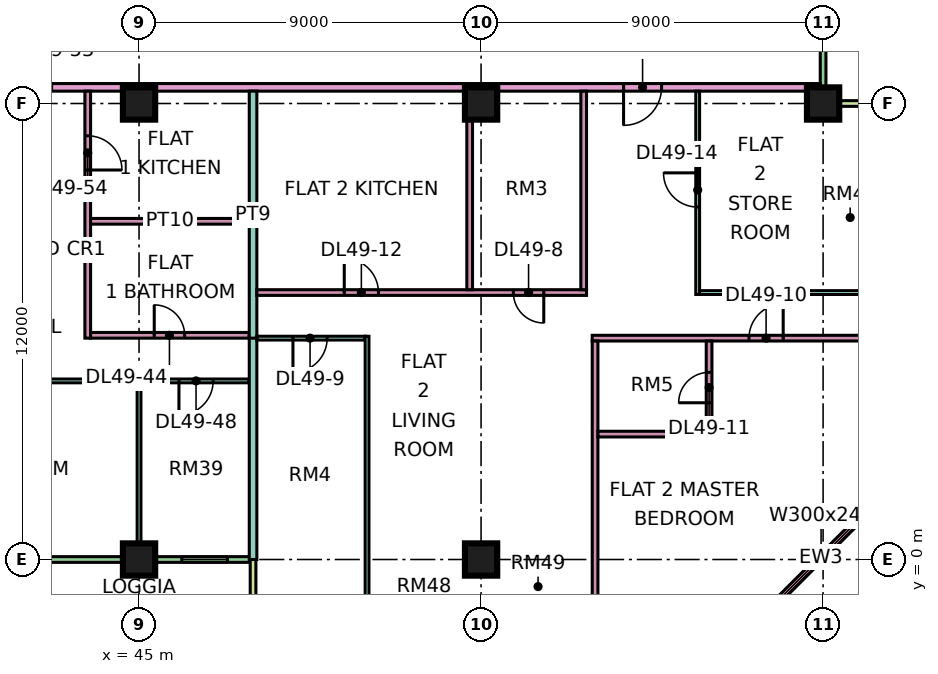
"""IFC4 building model, lengths in metres.
Left out: names, types, materials, properties, quantities, classifications, styles, units other than length and angle.
Written with IfcOpenShell. Run it as: python <this file> out.ifc"""

import sys

from ifc_helpers import new_model, si_unit, direction, frame, frame_2d, origin, origin_2d, place, context, subcontext, project, spatial, rectangle, extrude, element, fill, save


model = new_model("IFC4")
c1 = context("Model", 3, precision=1e-05, world=origin(), true_north=direction((0.0, 1.0)))
c2 = subcontext(c1, "Body", "Model", "MODEL_VIEW")
j1 = project(units=[si_unit("LENGTHUNIT", "METRE"), si_unit("PLANEANGLEUNIT", "RADIAN")], contexts=[c1])
p1 = place(None, origin())
s1 = spatial("IfcSite", under=j1, at=p1, CompositionType="ELEMENT")
p2 = place(p1, origin())
s2 = spatial("IfcBuilding", under=s1, at=p2, CompositionType="ELEMENT")
p3 = place(p2, frame((0.0, 0.0, 211.65)))
s3 = spatial("IfcBuildingStorey", under=s2, at=p3, CompositionType="ELEMENT", Elevation=211.65)
for number, where, z_axis, x_axis in (
    (1, (45.0, 0.0, 0.0), (0.0, 0.0, 1.0), (1.0, 0.0, 0.0)),
    (2, (45.0, 12.0, 0.0), (0.0, 0.0, 1.0), (1.0, 0.0, 0.0)),
    (3, (54.0, 0.0, 0.0), (0.0, 0.0, 1.0), (1.0, 0.0, 0.0)),
    (4, (54.0, 12.0, 0.0), (0.0, 0.0, 1.0), (1.0, 0.0, 0.0)),
    (5, (63.0, 12.0, 0.0), (0.0, 0.0, 1.0), (1.0, 0.0, 0.0)),
):
    element("IfcColumn", number, at=place(p3, frame(where, z_axis=z_axis, x_axis=x_axis)), inside=s3, PredefinedType="COLUMN", context=c2, shape_type="SweptSolid", body=[
        extrude(rectangle(XDim=0.85, YDim=0.85, at=origin_2d()), origin(), (0.0, 0.0, 1.0), 3.75),
    ])
p4 = place(p3, frame((36.075, 0.0, 0.0), z_axis=(0.0, 0.0, 1.0), x_axis=(1.0, 0.0, 0.0)))
e6 = element("IfcWall", 6, at=p4, inside=s3, PredefinedType="SOLIDWALL", context=c2, shape_type="SweptSolid", body=[
    extrude(rectangle(XDim=11.85, YDim=0.15, at=frame_2d((5.925, 0.0))), origin(), (0.0, 0.0, 1.0), 3.35),
])
p5 = place(p4, frame((3.525, 0.0, 0.0)))
e7 = element("IfcOpeningElement", 7, at=p5, cuts=e6, PredefinedType="OPENING", context=c2, shape_type="SweptSolid", body=[
    extrude(rectangle(XDim=1.8, YDim=2.4, at=frame_2d((0.9, 1.2))), frame((0.0, 0.085, 0.0), z_axis=(0.0, -1.0, 0.0), x_axis=(1.0, 0.0, 0.0)), (0.0, 0.0, 1.0), 0.17),
])
p6 = place(p4, frame((10.05, 0.0, 0.45)))
e8 = element("IfcOpeningElement", 8, at=p6, cuts=e6, PredefinedType="OPENING", context=c2, shape_type="SweptSolid", body=[
    extrude(rectangle(XDim=1.2, YDim=2.4, at=frame_2d((0.6, 1.2))), frame((0.0, 0.085, 0.0), z_axis=(0.0, -1.0, 0.0), x_axis=(1.0, 0.0, 0.0)), (0.0, 0.0, 1.0), 0.17),
])
p7 = place(p3, frame((48.0, -1.5, 0.0), z_axis=(0.0, 0.0, 1.0), x_axis=(0.0, 1.0, 0.0)))
e9 = element("IfcWall", 9, at=p7, inside=s3, PredefinedType="SOLIDWALL", context=c2, shape_type="SweptSolid", body=[
    extrude(rectangle(XDim=1.5, YDim=0.15, at=frame_2d((0.75, 0.0))), origin(), (0.0, 0.0, 1.0), 3.35),
])
p8 = place(p3, frame((61.447, -1.447, 0.0), z_axis=(0.0, 0.0, 1.0), x_axis=(0.707106781187, 0.707106781187, 0.0)))
e10 = element("IfcWall", 10, at=p8, inside=s3, PredefinedType="SOLIDWALL", context=c2, shape_type="SweptSolid", body=[
    extrude(rectangle(XDim=4.243, YDim=0.15, at=frame_2d((2.121, 0.0))), origin(), (0.0, 0.0, 1.0), 3.35),
])
p9 = place(p8, frame((0.621, 0.0, 0.45)))
e11 = element("IfcOpeningElement", 11, at=p9, cuts=e10, PredefinedType="OPENING", context=c2, shape_type="SweptSolid", body=[
    extrude(rectangle(XDim=3.0, YDim=2.4, at=frame_2d((1.5, 1.2))), frame((0.0, 0.085, 0.0), z_axis=(0.0, -1.0, 0.0), x_axis=(1.0, 0.0, 0.0)), (0.0, 0.0, 1.0), 0.17),
])
p10 = place(p3, frame((63.0, 12.075, 0.0), z_axis=(0.0, 0.0, 1.0), x_axis=(0.0, 1.0, 0.0)))
e12 = element("IfcWall", 12, at=p10, inside=s3, PredefinedType="SOLIDWALL", context=c2, shape_type="SweptSolid", body=[
    extrude(rectangle(XDim=10.35, YDim=0.15, at=frame_2d((5.175, 0.0))), origin(), (0.0, 0.0, 1.0), 3.35),
])
p11 = place(p10, frame((4.125, 0.0, 0.45)))
e13 = element("IfcOpeningElement", 13, at=p11, cuts=e12, PredefinedType="OPENING", context=c2, shape_type="SweptSolid", body=[
    extrude(rectangle(XDim=1.8, YDim=2.4, at=frame_2d((0.9, 1.2))), frame((0.0, 0.085, 0.0), z_axis=(0.0, -1.0, 0.0), x_axis=(1.0, 0.0, 0.0)), (0.0, 0.0, 1.0), 0.17),
])
p12 = place(p10, frame((7.538, 0.0, 0.0)))
e14 = element("IfcOpeningElement", 14, at=p12, cuts=e12, PredefinedType="OPENING", context=c2, shape_type="SweptSolid", body=[
    extrude(rectangle(XDim=1.8, YDim=2.4, at=frame_2d((0.9, 1.2))), frame((0.0, 0.085, 0.0), z_axis=(0.0, -1.0, 0.0), x_axis=(1.0, 0.0, 0.0)), (0.0, 0.0, 1.0), 0.17),
])
p13 = place(p3, frame((64.5, 12.0, 0.0), z_axis=(0.0, 0.0, 1.0), x_axis=(-1.0, 0.0, 0.0)))
e15 = element("IfcWall", 15, at=p13, inside=s3, PredefinedType="SOLIDWALL", context=c2, shape_type="SweptSolid", body=[
    extrude(rectangle(XDim=1.5, YDim=0.15, at=frame_2d((0.75, 0.0))), origin(), (0.0, 0.0, 1.0), 3.35),
])
p14 = place(p3, frame((33.05, 4.7, 0.0), z_axis=(0.0, 0.0, 1.0), x_axis=(1.0, 0.0, 0.0)))
e16 = element("IfcWall", 16, at=p14, inside=s3, PredefinedType="PARTITIONING", context=c2, shape_type="SweptSolid", body=[
    extrude(rectangle(XDim=14.85, YDim=0.1, at=frame_2d((7.425, 0.0))), origin(), (0.0, 0.0, 1.0), 3.35),
])
p15 = place(p14, frame((1.0, 0.0, 0.0)))
e17 = element("IfcOpeningElement", 17, at=p15, cuts=e16, PredefinedType="OPENING", context=c2, shape_type="SweptSolid", body=[
    extrude(rectangle(XDim=0.9, YDim=2.1, at=frame_2d((0.45, 1.05))), frame((0.0, 0.06, 0.0), z_axis=(0.0, -1.0, 0.0), x_axis=(1.0, 0.0, 0.0)), (0.0, 0.0, 1.0), 0.12),
])
p16 = place(p14, frame((13.0, 0.0, 0.0)))
e18 = element("IfcOpeningElement", 18, at=p16, cuts=e16, PredefinedType="OPENING", context=c2, shape_type="SweptSolid", body=[
    extrude(rectangle(XDim=0.9, YDim=2.1, at=frame_2d((0.45, 1.05))), frame((0.0, 0.06, 0.0), z_axis=(0.0, -1.0, 0.0), x_axis=(1.0, 0.0, 0.0)), (0.0, 0.0, 1.0), 0.12),
])
p17 = place(p14, frame((7.0, 0.0, 0.0)))
e19 = element("IfcOpeningElement", 19, at=p17, cuts=e16, PredefinedType="OPENING", context=c2, shape_type="SweptSolid", body=[
    extrude(rectangle(XDim=0.9, YDim=2.1, at=frame_2d((0.45, 1.05))), frame((0.0, 0.06, 0.0), z_axis=(0.0, -1.0, 0.0), x_axis=(1.0, 0.0, 0.0)), (0.0, 0.0, 1.0), 0.12),
])
p18 = place(p3, frame((40.65, 12.425, 0.0), z_axis=(0.0, 0.0, 1.0), x_axis=(1.0, 0.0, 0.0)))
e20 = element("IfcWall", 20, at=p18, inside=s3, PredefinedType="PARTITIONING", context=c2, shape_type="SweptSolid", body=[
    extrude(rectangle(XDim=22.276, YDim=0.2, at=frame_2d((11.138, 0.0))), origin(), (0.0, 0.0, 1.0), 3.35),
])
p19 = place(p18, frame((17.1, 0.0, 0.0)))
e21 = element("IfcOpeningElement", 21, at=p19, cuts=e20, PredefinedType="OPENING", context=c2, shape_type="SweptSolid", body=[
    extrude(rectangle(XDim=1.0, YDim=2.1, at=frame_2d((0.5, 1.05))), frame((0.0, 0.11, 0.0), z_axis=(0.0, -1.0, 0.0), x_axis=(1.0, 0.0, 0.0)), (0.0, 0.0, 1.0), 0.22),
])
p20 = place(p18, frame((1.05, 0.0, 0.0)))
e22 = element("IfcOpeningElement", 22, at=p20, cuts=e20, PredefinedType="OPENING", context=c2, shape_type="SweptSolid", body=[
    extrude(rectangle(XDim=1.0, YDim=2.1, at=frame_2d((0.5, 1.05))), frame((0.0, 0.11, 0.0), z_axis=(0.0, -1.0, 0.0), x_axis=(1.0, 0.0, 0.0)), (0.0, 0.0, 1.0), 0.22),
])
p21 = place(p3, frame((43.65, 5.825, 0.0), z_axis=(0.0, 0.0, 1.0), x_axis=(0.0, 1.0, 0.0)))
e23 = element("IfcWall", 23, at=p21, inside=s3, PredefinedType="PARTITIONING", context=c2, shape_type="SweptSolid", body=[
    extrude(rectangle(XDim=6.5, YDim=0.15, at=frame_2d((3.25, 0.0))), origin(), (0.0, 0.0, 1.0), 3.35),
])
p22 = place(p21, frame((4.425, 0.0, 0.0)))
e24 = element("IfcOpeningElement", 24, at=p22, cuts=e23, PredefinedType="OPENING", context=c2, shape_type="SweptSolid", body=[
    extrude(rectangle(XDim=0.9, YDim=2.1, at=frame_2d((0.45, 1.05))), frame((0.0, 0.085, 0.0), z_axis=(0.0, -1.0, 0.0), x_axis=(1.0, 0.0, 0.0)), (0.0, 0.0, 1.0), 0.17),
])
p23 = place(p3, frame((43.725, 5.9, 0.0), z_axis=(0.0, 0.0, 1.0), x_axis=(1.0, 0.0, 0.0)))
e25 = element("IfcWall", 25, at=p23, inside=s3, PredefinedType="PARTITIONING", context=c2, shape_type="SweptSolid", body=[
    extrude(rectangle(XDim=4.175, YDim=0.15, at=frame_2d((2.087, 0.0))), origin(), (0.0, 0.0, 1.0), 3.35),
])
p24 = place(p23, frame((1.675, 0.0, 0.0)))
e26 = element("IfcOpeningElement", 26, at=p24, cuts=e25, PredefinedType="OPENING", context=c2, shape_type="SweptSolid", body=[
    extrude(rectangle(XDim=0.8, YDim=2.1, at=frame_2d((0.4, 1.05))), frame((0.0, 0.085, 0.0), z_axis=(0.0, -1.0, 0.0), x_axis=(1.0, 0.0, 0.0)), (0.0, 0.0, 1.0), 0.17),
])
p25 = place(p3, frame((43.725, 8.9, 0.0), z_axis=(0.0, 0.0, 1.0), x_axis=(1.0, 0.0, 0.0)))
e27 = element("IfcWall", 27, at=p25, inside=s3, PredefinedType="PARTITIONING", context=c2, shape_type="SweptSolid", body=[
    extrude(rectangle(XDim=4.175, YDim=0.15, at=frame_2d((2.087, 0.0))), origin(), (0.0, 0.0, 1.0), 3.35),
])
p26 = place(p3, frame((45.0, 0.074, 0.0), z_axis=(0.0, 0.0, 1.0), x_axis=(0.0, 1.0, 0.0)))
e28 = element("IfcWall", 28, at=p26, inside=s3, PredefinedType="PARTITIONING", context=c2, shape_type="SweptSolid", body=[
    extrude(rectangle(XDim=4.576, YDim=0.1, at=frame_2d((2.288, 0.0))), origin(), (0.0, 0.0, 1.0), 3.35),
])
p27 = place(p3, frame((48.0, 0.0, 0.0), z_axis=(0.0, 0.0, 1.0), x_axis=(0.0, 1.0, 0.0)))
e29 = element("IfcWall", 29, at=p27, inside=s3, PredefinedType="PARTITIONING", context=c2, shape_type="SweptSolid", body=[
    extrude(rectangle(XDim=5.875, YDim=0.2, at=frame_2d((2.938, 0.0))), origin(), (0.0, 0.0, 1.0), 3.35),
])
p28 = place(p3, frame((48.0, 5.825, 0.0), z_axis=(0.0, 0.0, 1.0), x_axis=(0.0, 1.0, 0.0)))
e30 = element("IfcWall", 30, at=p28, inside=s3, PredefinedType="PARTITIONING", context=c2, shape_type="SweptSolid", body=[
    extrude(rectangle(XDim=6.5, YDim=0.2, at=frame_2d((3.25, 0.0))), origin(), (0.0, 0.0, 1.0), 3.35),
])
p29 = place(p3, frame((48.1, 5.825, 0.0), z_axis=(0.0, 0.0, 1.0), x_axis=(1.0, 0.0, 0.0)))
e31 = element("IfcWall", 31, at=p29, inside=s3, PredefinedType="PARTITIONING", context=c2, shape_type="SweptSolid", body=[
    extrude(rectangle(XDim=2.85, YDim=0.1, at=frame_2d((1.425, 0.0))), origin(), (0.0, 0.0, 1.0), 3.35),
])
p30 = place(p29, frame((0.95, 0.0, 0.0)))
e32 = element("IfcOpeningElement", 32, at=p30, cuts=e31, PredefinedType="OPENING", context=c2, shape_type="SweptSolid", body=[
    extrude(rectangle(XDim=0.9, YDim=2.1, at=frame_2d((0.45, 1.05))), frame((0.0, 0.06, 0.0), z_axis=(0.0, -1.0, 0.0), x_axis=(1.0, 0.0, 0.0)), (0.0, 0.0, 1.0), 0.12),
])
p31 = place(p3, frame((48.1, 7.025, 0.0), z_axis=(0.0, 0.0, 1.0), x_axis=(1.0, 0.0, 0.0)))
e33 = element("IfcWall", 33, at=p31, inside=s3, PredefinedType="PARTITIONING", context=c2, shape_type="SweptSolid", body=[
    extrude(rectangle(XDim=8.675, YDim=0.15, at=frame_2d((4.337, 0.0))), origin(), (0.0, 0.0, 1.0), 3.35),
])
p32 = place(p31, frame((6.75, 0.0, 0.0)))
e34 = element("IfcOpeningElement", 34, at=p32, cuts=e33, PredefinedType="OPENING", context=c2, shape_type="SweptSolid", body=[
    extrude(rectangle(XDim=0.8, YDim=2.1, at=frame_2d((0.4, 1.05))), frame((0.0, 0.085, 0.0), z_axis=(0.0, -1.0, 0.0), x_axis=(1.0, 0.0, 0.0)), (0.0, 0.0, 1.0), 0.17),
])
p33 = place(p31, frame((2.3, 0.0, 0.0)))
e35 = element("IfcOpeningElement", 35, at=p33, cuts=e33, PredefinedType="OPENING", context=c2, shape_type="SweptSolid", body=[
    extrude(rectangle(XDim=0.9, YDim=2.1, at=frame_2d((0.45, 1.05))), frame((0.0, 0.085, 0.0), z_axis=(0.0, -1.0, 0.0), x_axis=(1.0, 0.0, 0.0)), (0.0, 0.0, 1.0), 0.17),
])
p34 = place(p3, frame((51.0, -1.35, 0.0), z_axis=(0.0, 0.0, 1.0), x_axis=(0.0, 1.0, 0.0)))
e36 = element("IfcWall", 36, at=p34, inside=s3, PredefinedType="PARTITIONING", context=c2, shape_type="SweptSolid", body=[
    extrude(rectangle(XDim=7.225, YDim=0.1, at=frame_2d((3.613, 0.0))), origin(), (0.0, 0.0, 1.0), 3.35),
])
for number, where, z_axis, x_axis in (
    (37, (53.7, 7.1, 0.0), (0.0, 0.0, 1.0), (0.0, 1.0, 0.0)),
    (38, (56.7, 7.1, 0.0), (0.0, 0.0, 1.0), (0.0, 1.0, 0.0)),
):
    element("IfcWall", number, at=place(p3, frame(where, z_axis=z_axis, x_axis=x_axis)), inside=s3, PredefinedType="PARTITIONING", context=c2, shape_type="SweptSolid", body=[
        extrude(rectangle(XDim=5.225, YDim=0.15, at=frame_2d((2.612, 0.0))), origin(), (0.0, 0.0, 1.0), 3.35),
    ])
p35 = place(p3, frame((56.925, 5.825, 0.0), z_axis=(0.0, 0.0, 1.0), x_axis=(1.0, 0.0, 0.0)))
e39 = element("IfcWall", 39, at=p35, inside=s3, PredefinedType="PARTITIONING", context=c2, shape_type="SweptSolid", body=[
    extrude(rectangle(XDim=7.425, YDim=0.15, at=frame_2d((3.712, 0.0))), origin(), (0.0, 0.0, 1.0), 3.35),
])
p36 = place(p35, frame((4.125, 0.0, 0.0)))
e40 = element("IfcOpeningElement", 40, at=p36, cuts=e39, PredefinedType="OPENING", context=c2, shape_type="SweptSolid", body=[
    extrude(rectangle(XDim=0.9, YDim=2.1, at=frame_2d((0.45, 1.05))), frame((0.0, 0.085, 0.0), z_axis=(0.0, -1.0, 0.0), x_axis=(1.0, 0.0, 0.0)), (0.0, 0.0, 1.0), 0.17),
])
p37 = place(p3, frame((57.0, -1.35, 0.0), z_axis=(0.0, 0.0, 1.0), x_axis=(0.0, 1.0, 0.0)))
e41 = element("IfcWall", 41, at=p37, inside=s3, PredefinedType="PARTITIONING", context=c2, shape_type="SweptSolid", body=[
    extrude(rectangle(XDim=7.1, YDim=0.15, at=frame_2d((3.55, 0.0))), origin(), (0.0, 0.0, 1.0), 3.35),
])
p38 = place(p3, frame((57.075, 3.3, 0.0), z_axis=(0.0, 0.0, 1.0), x_axis=(1.0, 0.0, 0.0)))
e42 = element("IfcWall", 42, at=p38, inside=s3, PredefinedType="PARTITIONING", context=c2, shape_type="SweptSolid", body=[
    extrude(rectangle(XDim=3.0, YDim=0.15, at=frame_2d((1.5, 0.0))), origin(), (0.0, 0.0, 1.0), 3.35),
])
p39 = place(p3, frame((59.7, 6.975, 0.0), z_axis=(0.0, 0.0, 1.0), x_axis=(0.0, 1.0, 0.0)))
e43 = element("IfcWall", 43, at=p39, inside=s3, PredefinedType="PARTITIONING", context=c2, shape_type="SweptSolid", body=[
    extrude(rectangle(XDim=5.35, YDim=0.1, at=frame_2d((2.675, 0.0))), origin(), (0.0, 0.0, 1.0), 3.35),
])
p40 = place(p39, frame((2.3, 0.0, 0.0)))
e44 = element("IfcOpeningElement", 44, at=p40, cuts=e43, PredefinedType="OPENING", context=c2, shape_type="SweptSolid", body=[
    extrude(rectangle(XDim=0.9, YDim=2.1, at=frame_2d((0.45, 1.05))), frame((0.0, 0.06, 0.0), z_axis=(0.0, -1.0, 0.0), x_axis=(1.0, 0.0, 0.0)), (0.0, 0.0, 1.0), 0.12),
])
p41 = place(p3, frame((59.75, 7.025, 0.0), z_axis=(0.0, 0.0, 1.0), x_axis=(1.0, 0.0, 0.0)))
e45 = element("IfcWall", 45, at=p41, inside=s3, PredefinedType="PARTITIONING", context=c2, shape_type="SweptSolid", body=[
    extrude(rectangle(XDim=4.6, YDim=0.1, at=frame_2d((2.3, 0.0))), origin(), (0.0, 0.0, 1.0), 3.35),
])
p42 = place(p3, frame((60.0, 3.375, 0.0), z_axis=(0.0, 0.0, 1.0), x_axis=(0.0, 1.0, 0.0)))
e46 = element("IfcWall", 46, at=p42, inside=s3, PredefinedType="PARTITIONING", context=c2, shape_type="SweptSolid", body=[
    extrude(rectangle(XDim=2.375, YDim=0.15, at=frame_2d((1.188, 0.0))), origin(), (0.0, 0.0, 1.0), 3.35),
])
p43 = place(p42, frame((0.75, 0.0, 0.0)))
e47 = element("IfcOpeningElement", 47, at=p43, cuts=e46, PredefinedType="OPENING", context=c2, shape_type="SweptSolid", body=[
    extrude(rectangle(XDim=0.8, YDim=2.1, at=frame_2d((0.4, 1.05))), frame((0.0, 0.085, 0.0), z_axis=(0.0, -1.0, 0.0), x_axis=(1.0, 0.0, 0.0)), (0.0, 0.0, 1.0), 0.17),
])
p44 = place(p6, origin())
e48 = element("IfcWindow", 48, at=p44, inside=s3, PartitioningType="SINGLE_PANEL", PredefinedType="WINDOW", context=c2, shape_type="SweptSolid", body=[
    extrude(rectangle(XDim=1.2, YDim=2.4, at=frame_2d((0.6, 1.2))), frame((0.0, 0.03, 0.0), z_axis=(0.0, -1.0, 0.0), x_axis=(1.0, 0.0, 0.0)), (0.0, 0.0, 1.0), 0.06),
])
fill(e8, e48)
p45 = place(p9, origin())
e49 = element("IfcWindow", 49, at=p45, inside=s3, PartitioningType="SINGLE_PANEL", PredefinedType="WINDOW", context=c2, shape_type="SweptSolid", body=[
    extrude(rectangle(XDim=3.0, YDim=2.4, at=frame_2d((1.5, 1.2))), frame((0.0, 0.03, 0.0), z_axis=(0.0, -1.0, 0.0), x_axis=(1.0, 0.0, 0.0)), (0.0, 0.0, 1.0), 0.06),
])
fill(e11, e49)
p46 = place(p32, origin())
e50 = element("IfcDoor", 50, at=p46, inside=s3, OperationType="SINGLE_SWING_RIGHT", PredefinedType="DOOR", context=c2, shape_type="SweptSolid", body=[
    extrude(rectangle(XDim=0.8, YDim=2.1, at=frame_2d((0.4, 1.05))), frame((0.0, 0.025, 0.0), z_axis=(0.0, -1.0, 0.0), x_axis=(1.0, 0.0, 0.0)), (0.0, 0.0, 1.0), 0.05),
])
fill(e34, e50)
p47 = place(p30, frame((0.9, 0.0, 0.0), z_axis=(0.0, 0.0, 1.0), x_axis=(-1.0, 0.0, 0.0)))
e51 = element("IfcDoor", 51, at=p47, inside=s3, OperationType="SINGLE_SWING_LEFT", PredefinedType="DOOR", context=c2, shape_type="SweptSolid", body=[
    extrude(rectangle(XDim=0.9, YDim=2.1, at=frame_2d((0.45, 1.05))), frame((0.0, 0.025, 0.0), z_axis=(0.0, -1.0, 0.0), x_axis=(1.0, 0.0, 0.0)), (0.0, 0.0, 1.0), 0.05),
])
fill(e32, e51)
p48 = place(p36, frame((0.9, 0.0, 0.0), z_axis=(0.0, 0.0, 1.0), x_axis=(-1.0, 0.0, 0.0)))
e52 = element("IfcDoor", 52, at=p48, inside=s3, OperationType="SINGLE_SWING_RIGHT", PredefinedType="DOOR", context=c2, shape_type="SweptSolid", body=[
    extrude(rectangle(XDim=0.9, YDim=2.1, at=frame_2d((0.45, 1.05))), frame((0.0, 0.025, 0.0), z_axis=(0.0, -1.0, 0.0), x_axis=(1.0, 0.0, 0.0)), (0.0, 0.0, 1.0), 0.05),
])
fill(e40, e52)
p49 = place(p43, origin())
e53 = element("IfcDoor", 53, at=p49, inside=s3, OperationType="SINGLE_SWING_LEFT", PredefinedType="DOOR", context=c2, shape_type="SweptSolid", body=[
    extrude(rectangle(XDim=0.8, YDim=2.1, at=frame_2d((0.4, 1.05))), frame((0.0, 0.025, 0.0), z_axis=(0.0, -1.0, 0.0), x_axis=(1.0, 0.0, 0.0)), (0.0, 0.0, 1.0), 0.05),
])
fill(e47, e53)
p50 = place(p33, origin())
e54 = element("IfcDoor", 54, at=p50, inside=s3, OperationType="SINGLE_SWING_LEFT", PredefinedType="DOOR", context=c2, shape_type="SweptSolid", body=[
    extrude(rectangle(XDim=0.9, YDim=2.1, at=frame_2d((0.45, 1.05))), frame((0.0, 0.025, 0.0), z_axis=(0.0, -1.0, 0.0), x_axis=(1.0, 0.0, 0.0)), (0.0, 0.0, 1.0), 0.05),
])
fill(e35, e54)
p51 = place(p19, frame((1.0, 0.0, 0.0), z_axis=(0.0, 0.0, 1.0), x_axis=(-1.0, 0.0, 0.0)))
e55 = element("IfcDoor", 55, at=p51, inside=s3, OperationType="SINGLE_SWING_LEFT", PredefinedType="DOOR", context=c2, shape_type="SweptSolid", body=[
    extrude(rectangle(XDim=1.0, YDim=2.1, at=frame_2d((0.5, 1.05))), frame((0.0, 0.025, 0.0), z_axis=(0.0, -1.0, 0.0), x_axis=(1.0, 0.0, 0.0)), (0.0, 0.0, 1.0), 0.05),
])
fill(e21, e55)
p52 = place(p40, frame((0.9, 0.0, 0.0), z_axis=(0.0, 0.0, 1.0), x_axis=(-1.0, 0.0, 0.0)))
e56 = element("IfcDoor", 56, at=p52, inside=s3, OperationType="SINGLE_SWING_RIGHT", PredefinedType="DOOR", context=c2, shape_type="SweptSolid", body=[
    extrude(rectangle(XDim=0.9, YDim=2.1, at=frame_2d((0.45, 1.05))), frame((0.0, 0.025, 0.0), z_axis=(0.0, -1.0, 0.0), x_axis=(1.0, 0.0, 0.0)), (0.0, 0.0, 1.0), 0.05),
])
fill(e44, e56)
p53 = place(p24, origin())
e57 = element("IfcDoor", 57, at=p53, inside=s3, OperationType="SINGLE_SWING_LEFT", PredefinedType="DOOR", context=c2, shape_type="SweptSolid", body=[
    extrude(rectangle(XDim=0.8, YDim=2.1, at=frame_2d((0.4, 1.05))), frame((0.0, 0.025, 0.0), z_axis=(0.0, -1.0, 0.0), x_axis=(1.0, 0.0, 0.0)), (0.0, 0.0, 1.0), 0.05),
])
fill(e26, e57)
p54 = place(p16, frame((0.9, 0.0, 0.0), z_axis=(0.0, 0.0, 1.0), x_axis=(-1.0, 0.0, 0.0)))
e58 = element("IfcDoor", 58, at=p54, inside=s3, OperationType="SINGLE_SWING_LEFT", PredefinedType="DOOR", context=c2, shape_type="SweptSolid", body=[
    extrude(rectangle(XDim=0.9, YDim=2.1, at=frame_2d((0.45, 1.05))), frame((0.0, 0.025, 0.0), z_axis=(0.0, -1.0, 0.0), x_axis=(1.0, 0.0, 0.0)), (0.0, 0.0, 1.0), 0.05),
])
fill(e18, e58)
p55 = place(p22, frame((0.9, 0.0, 0.0), z_axis=(0.0, 0.0, 1.0), x_axis=(-1.0, 0.0, 0.0)))
e59 = element("IfcDoor", 59, at=p55, inside=s3, OperationType="SINGLE_SWING_LEFT", PredefinedType="DOOR", context=c2, shape_type="SweptSolid", body=[
    extrude(rectangle(XDim=0.9, YDim=2.1, at=frame_2d((0.45, 1.05))), frame((0.0, 0.025, 0.0), z_axis=(0.0, -1.0, 0.0), x_axis=(1.0, 0.0, 0.0)), (0.0, 0.0, 1.0), 0.05),
])
fill(e24, e59)
save(model, sys.argv[1])
